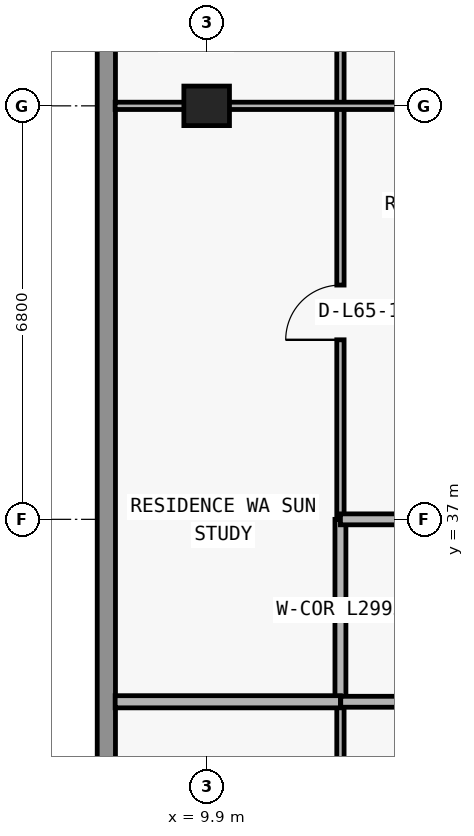
"""IFC4 building model, lengths in metres.
Left out: names, types, materials, properties, quantities, classifications, styles, units other than length and angle.
Written with IfcOpenShell. Run it as: python <this file> out.ifc"""

import sys

from ifc_helpers import new_model, si_unit, direction, frame, frame_2d, origin, origin_2d, place, context, subcontext, project, spatial, rectangle, extrude, element, fill, save


model = new_model("IFC4")
c1 = context("Model", 3, precision=1e-05, world=origin(), true_north=direction((0.0, 1.0)))
c2 = subcontext(c1, "Body", "Model", "MODEL_VIEW")
j1 = project(units=[si_unit("LENGTHUNIT", "METRE"), si_unit("PLANEANGLEUNIT", "RADIAN")], contexts=[c1])
p1 = place(None, origin())
s1 = spatial("IfcSite", under=j1, at=p1, CompositionType="ELEMENT")
p2 = place(p1, origin())
s2 = spatial("IfcBuilding", under=s1, at=p2, CompositionType="ELEMENT")
p3 = place(p2, frame((0.0, 0.0, 233.1)))
s3 = spatial("IfcBuildingStorey", under=s2, at=p3, CompositionType="ELEMENT", Elevation=233.1)
p4 = place(p3, frame((9.9, 43.8, 0.0), z_axis=(0.0, 0.0, 1.0), x_axis=(1.0, 0.0, 0.0)))
e1 = element("IfcColumn", 1, at=p4, inside=s3, PredefinedType="COLUMN", context=c2, shape_type="SweptSolid", body=[
    extrude(rectangle(XDim=0.75, YDim=0.65, at=origin_2d()), origin(), (0.0, 0.0, 1.0), 3.05),
])
p5 = place(p3, frame((8.25, 30.15, 0.0), z_axis=(0.0, 0.0, 1.0), x_axis=(0.0, 1.0, 0.0)))
e2 = element("IfcWall", 2, at=p5, inside=s3, PredefinedType="STANDARD", context=c2, shape_type="SweptSolid", body=[
    extrude(rectangle(XDim=16.85, YDim=0.3, at=frame_2d((8.425, 0.0))), origin(), (0.0, 0.0, 1.0), 3.05),
])
p6 = place(p3, frame((12.1, 29.44, 0.0), z_axis=(0.0, 0.0, 1.0), x_axis=(0.0, 1.0, 0.0)))
e3 = element("IfcWall", 3, at=p6, inside=s3, PredefinedType="PARTITIONING", context=c2, shape_type="SweptSolid", body=[
    extrude(rectangle(XDim=4.56, YDim=0.12, at=frame_2d((2.28, 0.0))), origin(), (0.0, 0.0, 1.0), 2.725),
])
p7 = place(p3, frame((12.1, 34.005, 0.0), z_axis=(0.0, 0.0, 1.0), x_axis=(0.0, 1.0, 0.0)))
e4 = element("IfcWall", 4, at=p7, inside=s3, PredefinedType="PARTITIONING", context=c2, shape_type="SweptSolid", body=[
    extrude(rectangle(XDim=2.995, YDim=0.18, at=frame_2d((1.498, 0.0))), origin(), (0.0, 0.0, 1.0), 2.725),
])
p8 = place(p3, frame((12.1, 37.005, 0.0), z_axis=(0.0, 0.0, 1.0), x_axis=(0.0, 1.0, 0.0)))
e5 = element("IfcWall", 5, at=p8, inside=s3, PredefinedType="PARTITIONING", context=c2, shape_type="SweptSolid", body=[
    extrude(rectangle(XDim=9.875, YDim=0.12, at=frame_2d((4.938, 0.0))), origin(), (0.0, 0.0, 1.0), 2.725),
])
p9 = place(p8, frame((2.948, 0.0, 0.0)))
e6 = element("IfcOpeningElement", 6, at=p9, cuts=e5, PredefinedType="OPENING", context=c2, shape_type="SweptSolid", body=[
    extrude(rectangle(XDim=0.9, YDim=2.15, at=frame_2d((0.45, 1.075))), frame((0.0, 0.07, 0.0), z_axis=(0.0, -1.0, 0.0), x_axis=(1.0, 0.0, 0.0)), (0.0, 0.0, 1.0), 0.14),
])
p10 = place(p8, frame((7.885, 0.0, 0.0)))
e7 = element("IfcOpeningElement", 7, at=p10, cuts=e5, PredefinedType="OPENING", context=c2, shape_type="SweptSolid", body=[
    extrude(rectangle(XDim=0.9, YDim=2.15, at=frame_2d((0.45, 1.075))), frame((0.0, 0.07, 0.0), z_axis=(0.0, -1.0, 0.0), x_axis=(1.0, 0.0, 0.0)), (0.0, 0.0, 1.0), 0.14),
])
p11 = place(p3, frame((8.395, 34.0, 0.0), z_axis=(0.0, 0.0, 1.0), x_axis=(1.0, 0.0, 0.0)))
e8 = element("IfcWall", 8, at=p11, inside=s3, PredefinedType="PARTITIONING", context=c2, shape_type="SweptSolid", body=[
    extrude(rectangle(XDim=3.705, YDim=0.2, at=frame_2d((1.853, 0.0))), origin(), (0.0, 0.0, 1.0), 3.05),
])
p12 = place(p3, frame((12.105, 34.0, 0.0), z_axis=(0.0, 0.0, 1.0), x_axis=(1.0, 0.0, 0.0)))
e9 = element("IfcWall", 9, at=p12, inside=s3, PredefinedType="PARTITIONING", context=c2, shape_type="SweptSolid", body=[
    extrude(rectangle(XDim=14.545, YDim=0.18, at=frame_2d((7.272, 0.0))), origin(), (0.0, 0.0, 1.0), 3.05),
])
p13 = place(p12, frame((1.607, 0.0, 0.0)))
e10 = element("IfcOpeningElement", 10, at=p13, cuts=e9, PredefinedType="OPENING", context=c2, shape_type="SweptSolid", body=[
    extrude(rectangle(XDim=1.0, YDim=2.2, at=frame_2d((0.5, 1.1))), frame((0.0, 0.1, 0.0), z_axis=(0.0, -1.0, 0.0), x_axis=(1.0, 0.0, 0.0)), (0.0, 0.0, 1.0), 0.2),
])
p14 = place(p3, frame((12.1, 37.0, 0.0), z_axis=(0.0, 0.0, 1.0), x_axis=(1.0, 0.0, 0.0)))
e11 = element("IfcWall", 11, at=p14, inside=s3, PredefinedType="PARTITIONING", context=c2, shape_type="SweptSolid", body=[
    extrude(rectangle(XDim=5.845, YDim=0.18, at=frame_2d((2.922, 0.0))), origin(), (0.0, 0.0, 1.0), 3.05),
])
p15 = place(p14, frame((1.275, 0.0, 0.0)))
e12 = element("IfcOpeningElement", 12, at=p15, cuts=e11, PredefinedType="OPENING", context=c2, shape_type="SweptSolid", body=[
    extrude(rectangle(XDim=1.0, YDim=2.2, at=frame_2d((0.5, 1.1))), frame((0.0, 0.1, 0.0), z_axis=(0.0, -1.0, 0.0), x_axis=(1.0, 0.0, 0.0)), (0.0, 0.0, 1.0), 0.2),
])
p16 = place(p3, frame((8.395, 43.8, 0.0), z_axis=(0.0, 0.0, 1.0), x_axis=(1.0, 0.0, 0.0)))
e13 = element("IfcWall", 13, at=p16, inside=s3, PredefinedType="PARTITIONING", context=c2, shape_type="SweptSolid", body=[
    extrude(rectangle(XDim=9.56, YDim=0.12, at=frame_2d((4.78, 0.0))), origin(), (0.0, 0.0, 1.0), 2.418),
])
p17 = place(p16, frame((5.03, 0.0, 0.0)))
e14 = element("IfcOpeningElement", 14, at=p17, cuts=e13, PredefinedType="OPENING", context=c2, shape_type="SweptSolid", body=[
    extrude(rectangle(XDim=0.9, YDim=2.15, at=frame_2d((0.45, 1.075))), frame((0.0, 0.07, 0.0), z_axis=(0.0, -1.0, 0.0), x_axis=(1.0, 0.0, 0.0)), (0.0, 0.0, 1.0), 0.14),
])
p18 = place(p16, frame((7.982, 0.0, 0.0)))
e15 = element("IfcOpeningElement", 15, at=p18, cuts=e13, PredefinedType="OPENING", context=c2, shape_type="SweptSolid", body=[
    extrude(rectangle(XDim=0.85, YDim=2.1, at=frame_2d((0.425, 1.05))), frame((0.0, 0.07, 0.0), z_axis=(0.0, -1.0, 0.0), x_axis=(1.0, 0.0, 0.0)), (0.0, 0.0, 1.0), 0.14),
])
p19 = place(p9, origin())
e16 = element("IfcDoor", 16, at=p19, inside=s3, OperationType="SINGLE_SWING_LEFT", PredefinedType="DOOR", context=c2, shape_type="SweptSolid", body=[
    extrude(rectangle(XDim=0.9, YDim=2.15, at=frame_2d((0.45, 1.075))), frame((0.0, 0.025, 0.0), z_axis=(0.0, -1.0, 0.0), x_axis=(1.0, 0.0, 0.0)), (0.0, 0.0, 1.0), 0.05),
])
fill(e6, e16)
save(model, sys.argv[1])
